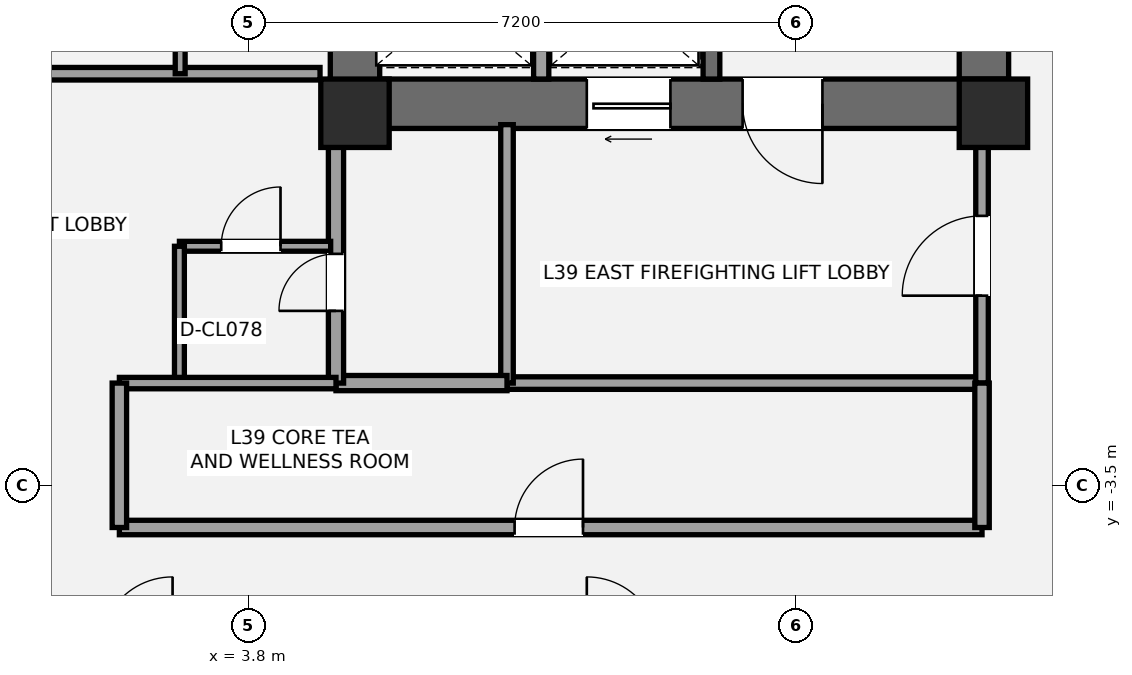
"""IFC4 building model, lengths in metres.
Left out: names, types, materials, properties, quantities, classifications, styles, units other than length and angle.
Written with IfcOpenShell. Run it as: python <this file> out.ifc"""

import sys

from ifc_helpers import new_model, si_unit, direction, frame, frame_2d, origin, origin_2d, place, context, subcontext, project, spatial, rectangle, extrude, element, fill, save


model = new_model("IFC4")
c1 = context("Model", 3, precision=1e-05, world=origin(), true_north=direction((0.0, 1.0)))
c2 = subcontext(c1, "Body", "Model", "MODEL_VIEW")
j1 = project(units=[si_unit("LENGTHUNIT", "METRE"), si_unit("PLANEANGLEUNIT", "RADIAN")], contexts=[c1])
p1 = place(None, origin())
s1 = spatial("IfcSite", under=j1, at=p1, CompositionType="ELEMENT")
p2 = place(p1, origin())
s2 = spatial("IfcBuilding", under=s1, at=p2, CompositionType="ELEMENT")
p3 = place(p2, frame((0.0, 0.0, 147.0)))
s3 = spatial("IfcBuildingStorey", under=s2, at=p3, CompositionType="ELEMENT", Elevation=147.0)
p4 = place(p3, frame((13.475, 1.2, 0.0), z_axis=(0.0, 0.0, 1.0), x_axis=(0.0, 1.0, 0.0)))
e1 = element("IfcWall", 1, at=p4, inside=s3, PredefinedType="SHEAR", context=c2, shape_type="SweptSolid", body=[
    extrude(rectangle(XDim=8.45, YDim=0.65, at=frame_2d((4.225, 0.0))), origin(), (0.0, 0.0, 1.0), 3.2),
])
p5 = place(p3, frame((13.8, 1.525, 0.0), z_axis=(0.0, 0.0, 1.0), x_axis=(-1.0, 0.0, 0.0)))
e2 = element("IfcWall", 2, at=p5, inside=s3, PredefinedType="SHEAR", context=c2, shape_type="SweptSolid", body=[
    extrude(rectangle(XDim=8.925, YDim=0.65, at=frame_2d((4.462, 0.0))), origin(), (0.0, 0.0, 1.0), 3.2),
])
p6 = place(p5, frame((2.45, 0.0, 0.0)))
e3 = element("IfcOpeningElement", 3, at=p6, cuts=e2, PredefinedType="OPENING", context=c2, shape_type="SweptSolid", body=[
    extrude(rectangle(XDim=1.05, YDim=2.15, at=frame_2d((0.525, 1.075))), frame((0.0, 0.335, 0.0), z_axis=(0.0, -1.0, 0.0), x_axis=(1.0, 0.0, 0.0)), (0.0, 0.0, 1.0), 0.67),
])
p7 = place(p5, frame((4.45, 0.0, 0.0)))
e4 = element("IfcOpeningElement", 4, at=p7, cuts=e2, PredefinedType="OPENING", context=c2, shape_type="SweptSolid", body=[
    extrude(rectangle(XDim=1.1, YDim=2.2, at=frame_2d((0.55, 1.1))), frame((0.0, 0.335, 0.0), z_axis=(0.0, -1.0, 0.0), x_axis=(1.0, 0.0, 0.0)), (0.0, 0.0, 1.0), 0.67),
])
p8 = place(p3, frame((5.2, 1.2, 0.0), z_axis=(0.0, 0.0, 1.0), x_axis=(0.0, 1.0, 0.0)))
e5 = element("IfcWall", 5, at=p8, inside=s3, PredefinedType="SHEAR", context=c2, shape_type="SweptSolid", body=[
    extrude(rectangle(XDim=2.6, YDim=0.65, at=frame_2d((1.3, 0.0))), origin(), (0.0, 0.0, 1.0), 3.2),
])
p9 = place(p3, frame((9.89, 1.85, 0.0), z_axis=(0.0, 0.0, 1.0), x_axis=(0.0, 1.0, 0.0)))
e6 = element("IfcWall", 6, at=p9, inside=s3, PredefinedType="SHEAR", context=c2, shape_type="SweptSolid", body=[
    extrude(rectangle(XDim=7.15, YDim=0.22, at=frame_2d((3.575, 0.0))), origin(), (0.0, 0.0, 1.0), 3.2),
])
for number, where, z_axis, x_axis in (
    (7, (5.2, 1.4, 0.0), (0.0, 0.0, 1.0), (1.0, 0.0, 0.0)),
    (8, (13.6, 1.4, 0.0), (0.0, 0.0, 1.0), (1.0, 0.0, 0.0)),
):
    element("IfcColumn", number, at=place(p3, frame(where, z_axis=z_axis, x_axis=x_axis)), inside=s3, PredefinedType="COLUMN", context=c2, shape_type="SweptSolid", body=[
        extrude(rectangle(XDim=0.9, YDim=0.9, at=origin_2d()), origin(), (0.0, 0.0, 1.0), 3.2),
    ])
p10 = place(p3, frame((7.2, -2.15, 0.0), z_axis=(0.0, 0.0, 1.0), x_axis=(1.0, 0.0, 0.0)))
e9 = element("IfcWall", 9, at=p10, inside=s3, PredefinedType="PARTITIONING", context=c2, shape_type="SweptSolid", body=[
    extrude(rectangle(XDim=6.25, YDim=0.165, at=frame_2d((3.125, 0.0))), origin(), (0.0, 0.0, 1.0), 3.02),
])
p11 = place(p3, frame((7.2, -2.15, 0.0), z_axis=(0.0, 0.0, 1.0), x_axis=(0.0, 1.0, 0.0)))
e10 = element("IfcWall", 10, at=p11, inside=s3, PredefinedType="PARTITIONING", context=c2, shape_type="SweptSolid", body=[
    extrude(rectangle(XDim=3.4, YDim=0.165, at=frame_2d((1.7, 0.0))), origin(), (0.0, 0.0, 1.0), 2.473),
])
p12 = place(p3, frame((13.45, -2.15, 0.0), z_axis=(0.0, 0.0, 1.0), x_axis=(0.0, 1.0, 0.0)))
e11 = element("IfcWall", 11, at=p12, inside=s3, PredefinedType="PARTITIONING", context=c2, shape_type="SweptSolid", body=[
    extrude(rectangle(XDim=3.4, YDim=0.165, at=frame_2d((1.7, 0.0))), origin(), (0.0, 0.0, 1.0), 2.473),
])
p13 = place(p12, frame((1.15, 0.0, 0.0)))
e12 = element("IfcOpeningElement", 12, at=p13, cuts=e11, PredefinedType="OPENING", context=c2, shape_type="SweptSolid", body=[
    extrude(rectangle(XDim=1.05, YDim=2.15, at=frame_2d((0.525, 1.075))), frame((0.0, 0.093, 0.0), z_axis=(0.0, -1.0, 0.0), x_axis=(1.0, 0.0, 0.0)), (0.0, 0.0, 1.0), 0.185),
])
p14 = place(p3, frame((4.95, -2.15, 0.0), z_axis=(0.0, 0.0, 1.0), x_axis=(1.0, 0.0, 0.0)))
e13 = element("IfcWall", 13, at=p14, inside=s3, PredefinedType="SOLIDWALL", context=c2, shape_type="SweptSolid", body=[
    extrude(rectangle(XDim=2.25, YDim=0.2, at=frame_2d((1.125, 0.0))), origin(), (0.0, 0.0, 1.0), 3.02),
])
p15 = place(p3, frame((4.95, -2.15, 0.0), z_axis=(0.0, 0.0, 1.0), x_axis=(0.0, 1.0, 0.0)))
e14 = element("IfcWall", 14, at=p15, inside=s3, PredefinedType="SOLIDWALL", context=c2, shape_type="SweptSolid", body=[
    extrude(rectangle(XDim=3.4, YDim=0.2, at=frame_2d((1.7, 0.0))), origin(), (0.0, 0.0, 1.0), 2.473),
])
p16 = place(p15, frame((0.95, 0.0, 0.0)))
e15 = element("IfcOpeningElement", 15, at=p16, cuts=e14, PredefinedType="OPENING", context=c2, shape_type="SweptSolid", body=[
    extrude(rectangle(XDim=0.75, YDim=2.1, at=frame_2d((0.375, 1.05))), frame((0.0, 0.11, 0.0), z_axis=(0.0, -1.0, 0.0), x_axis=(1.0, 0.0, 0.0)), (0.0, 0.0, 1.0), 0.22),
])
p17 = place(p3, frame((2.89, -0.35, 0.0), z_axis=(0.0, 0.0, 1.0), x_axis=(1.0, 0.0, 0.0)))
e16 = element("IfcWall", 16, at=p17, inside=s3, PredefinedType="PARTITIONING", context=c2, shape_type="SweptSolid", body=[
    extrude(rectangle(XDim=1.99, YDim=0.13, at=frame_2d((0.995, 0.0))), origin(), (0.0, 0.0, 1.0), 3.02),
])
p18 = place(p17, frame((0.55, 0.0, 0.0)))
e17 = element("IfcOpeningElement", 17, at=p18, cuts=e16, PredefinedType="OPENING", context=c2, shape_type="SweptSolid", body=[
    extrude(rectangle(XDim=0.78, YDim=2.1, at=frame_2d((0.39, 1.05))), frame((0.0, 0.075, 0.0), z_axis=(0.0, -1.0, 0.0), x_axis=(1.0, 0.0, 0.0)), (0.0, 0.0, 1.0), 0.15),
])
p19 = place(p3, frame((2.89, -2.15, 0.0), z_axis=(0.0, 0.0, 1.0), x_axis=(0.0, 1.0, 0.0)))
e18 = element("IfcWall", 18, at=p19, inside=s3, PredefinedType="PARTITIONING", context=c2, shape_type="SweptSolid", body=[
    extrude(rectangle(XDim=1.8, YDim=0.13, at=frame_2d((0.9, 0.0))), origin(), (0.0, 0.0, 1.0), 3.02),
])
p20 = place(p3, frame((7.65, 1.85, 0.0), z_axis=(0.0, 0.0, 1.0), x_axis=(0.0, 1.0, 0.0)))
e19 = element("IfcWall", 19, at=p20, inside=s3, PredefinedType="SOLIDWALL", context=c2, shape_type="SweptSolid", body=[
    extrude(rectangle(XDim=1.97, YDim=0.2, at=frame_2d((0.985, 0.0))), origin(), (0.0, 0.0, 1.0), 3.02),
])
p21 = place(p3, frame((0.85, 1.92, 0.0), z_axis=(0.0, 0.0, 1.0), x_axis=(1.0, 0.0, 0.0)))
e20 = element("IfcWall", 20, at=p21, inside=s3, PredefinedType="PARTITIONING", context=c2, shape_type="SweptSolid", body=[
    extrude(rectangle(XDim=3.89, YDim=0.165, at=frame_2d((1.945, 0.0))), origin(), (0.0, 0.0, 1.0), 2.16),
])
p22 = place(p3, frame((2.9, 1.92, 0.0), z_axis=(0.0, 0.0, 1.0), x_axis=(0.0, 1.0, 0.0)))
e21 = element("IfcWall", 21, at=p22, inside=s3, PredefinedType="PARTITIONING", context=c2, shape_type="SweptSolid", body=[
    extrude(rectangle(XDim=1.82, YDim=0.13, at=frame_2d((0.91, 0.0))), origin(), (0.0, 0.0, 1.0), 3.02),
])
p23 = place(p3, frame((2.1, -4.05, 0.0), z_axis=(0.0, 0.0, 1.0), x_axis=(1.0, 0.0, 0.0)))
e22 = element("IfcWall", 22, at=p23, inside=s3, PredefinedType="PLUMBINGWALL", context=c2, shape_type="SweptSolid", body=[
    extrude(rectangle(XDim=11.35, YDim=0.19, at=frame_2d((5.675, 0.0))), origin(), (0.0, 0.0, 1.0), 2.555),
])
p24 = place(p23, frame((5.2, 0.0, 0.0)))
e23 = element("IfcOpeningElement", 23, at=p24, cuts=e22, PredefinedType="OPENING", context=c2, shape_type="SweptSolid", body=[
    extrude(rectangle(XDim=0.9, YDim=2.1, at=frame_2d((0.45, 1.05))), frame((0.0, 0.105, 0.0), z_axis=(0.0, -1.0, 0.0), x_axis=(1.0, 0.0, 0.0)), (0.0, 0.0, 1.0), 0.21),
])
p25 = place(p3, frame((2.1, -2.15, 0.0), z_axis=(0.0, 0.0, 1.0), x_axis=(1.0, 0.0, 0.0)))
e24 = element("IfcWall", 24, at=p25, inside=s3, PredefinedType="PLUMBINGWALL", context=c2, shape_type="SweptSolid", body=[
    extrude(rectangle(XDim=2.85, YDim=0.15, at=frame_2d((1.425, 0.0))), origin(), (0.0, 0.0, 1.0), 3.02),
])
for number, where, z_axis, x_axis in (
    (25, (2.1, -4.05, 0.0), (0.0, 0.0, 1.0), (0.0, 1.0, 0.0)),
    (26, (13.45, -4.05, 0.0), (0.0, 0.0, 1.0), (0.0, 1.0, 0.0)),
):
    element("IfcWall", number, at=place(p3, frame(where, z_axis=z_axis, x_axis=x_axis)), inside=s3, PredefinedType="PLUMBINGWALL", context=c2, shape_type="SweptSolid", body=[
        extrude(rectangle(XDim=1.9, YDim=0.19, at=frame_2d((0.95, 0.0))), origin(), (0.0, 0.0, 1.0), 3.02),
    ])
p26 = place(p6, origin())
e27 = element("IfcDoor", 27, at=p26, inside=s3, OperationType="SINGLE_SWING_LEFT", PredefinedType="DOOR", context=c2, shape_type="SweptSolid", body=[
    extrude(rectangle(XDim=1.05, YDim=2.15, at=frame_2d((0.525, 1.075))), frame((0.0, 0.025, 0.0), z_axis=(0.0, -1.0, 0.0), x_axis=(1.0, 0.0, 0.0)), (0.0, 0.0, 1.0), 0.05),
])
fill(e3, e27)
p27 = place(p13, origin())
e28 = element("IfcDoor", 28, at=p27, inside=s3, OperationType="SINGLE_SWING_LEFT", PredefinedType="DOOR", context=c2, shape_type="SweptSolid", body=[
    extrude(rectangle(XDim=1.05, YDim=2.15, at=frame_2d((0.525, 1.075))), frame((0.0, 0.025, 0.0), z_axis=(0.0, -1.0, 0.0), x_axis=(1.0, 0.0, 0.0)), (0.0, 0.0, 1.0), 0.05),
])
fill(e12, e28)
p28 = place(p16, origin())
e29 = element("IfcDoor", 29, at=p28, inside=s3, OperationType="SINGLE_SWING_LEFT", PredefinedType="DOOR", context=c2, shape_type="SweptSolid", body=[
    extrude(rectangle(XDim=0.75, YDim=2.1, at=frame_2d((0.375, 1.05))), frame((0.0, 0.025, 0.0), z_axis=(0.0, -1.0, 0.0), x_axis=(1.0, 0.0, 0.0)), (0.0, 0.0, 1.0), 0.05),
])
fill(e15, e29)
p29 = place(p18, origin())
e30 = element("IfcDoor", 30, at=p29, inside=s3, OperationType="SINGLE_SWING_RIGHT", PredefinedType="DOOR", context=c2, shape_type="SweptSolid", body=[
    extrude(rectangle(XDim=0.78, YDim=2.1, at=frame_2d((0.39, 1.05))), frame((0.0, 0.025, 0.0), z_axis=(0.0, -1.0, 0.0), x_axis=(1.0, 0.0, 0.0)), (0.0, 0.0, 1.0), 0.05),
])
fill(e17, e30)
p30 = place(p7, origin())
e31 = element("IfcDoor", 31, at=p30, inside=s3, OperationType="SLIDING_TO_LEFT", PredefinedType="DOOR", context=c2, shape_type="SweptSolid", body=[
    extrude(rectangle(XDim=1.1, YDim=2.2, at=frame_2d((0.55, 1.1))), frame((0.0, 0.025, 0.0), z_axis=(0.0, -1.0, 0.0), x_axis=(1.0, 0.0, 0.0)), (0.0, 0.0, 1.0), 0.05),
])
fill(e4, e31)
p31 = place(p24, origin())
e32 = element("IfcDoor", 32, at=p31, inside=s3, OperationType="SINGLE_SWING_RIGHT", PredefinedType="DOOR", context=c2, shape_type="SweptSolid", body=[
    extrude(rectangle(XDim=0.9, YDim=2.1, at=frame_2d((0.45, 1.05))), frame((0.0, 0.025, 0.0), z_axis=(0.0, -1.0, 0.0), x_axis=(1.0, 0.0, 0.0)), (0.0, 0.0, 1.0), 0.05),
])
fill(e23, e32)
save(model, sys.argv[1])
